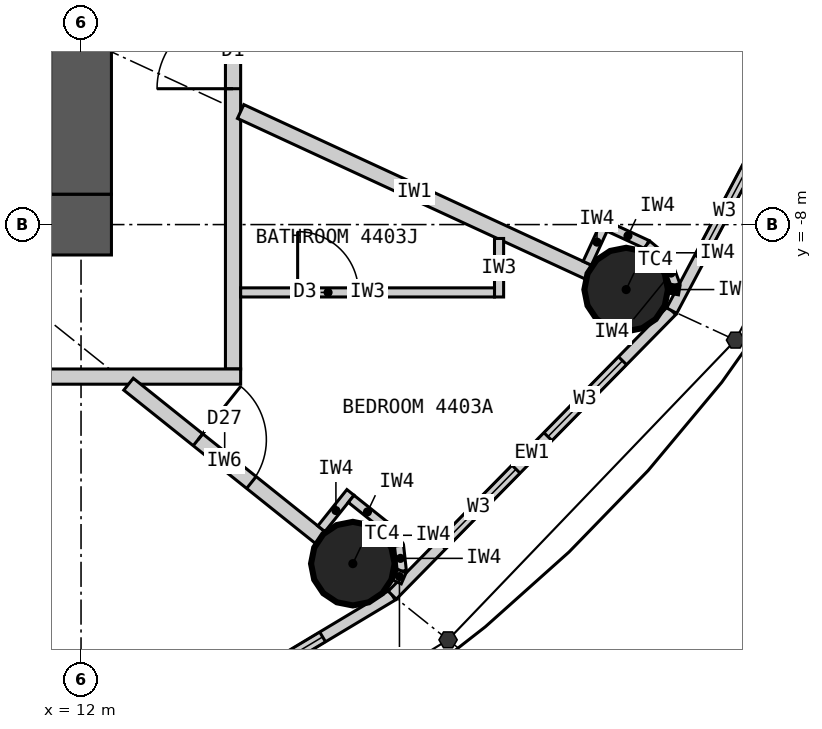
"""IFC4 building model, lengths in metres.
Left out: names, types, materials, properties, quantities, classifications, styles, units other than length and angle.
Written with IfcOpenShell. Run it as: python <this file> out.ifc"""

import sys

from ifc_helpers import new_model, si_unit, direction, frame, frame_2d, origin, origin_2d, place, context, subcontext, project, spatial, rectangle, circle, extrude, element, fill, save


model = new_model("IFC4")
c1 = context("Model", 3, precision=1e-05, world=origin(), true_north=direction((0.0, 1.0)))
c2 = subcontext(c1, "Body", "Model", "MODEL_VIEW")
j1 = project(units=[si_unit("LENGTHUNIT", "METRE"), si_unit("PLANEANGLEUNIT", "RADIAN")], contexts=[c1])
p1 = place(None, origin())
s1 = spatial("IfcSite", under=j1, at=p1, CompositionType="ELEMENT")
p2 = place(p1, origin())
s2 = spatial("IfcBuilding", under=s1, at=p2, CompositionType="ELEMENT")
p3 = place(p2, frame((0.0, 0.0, 166.5)))
s3 = spatial("IfcBuildingStorey", under=s2, at=p3, CompositionType="ELEMENT", Elevation=166.5)
for number, where, z_axis, x_axis in (
    (1, (15.576, -12.461, 0.0), (0.0, 0.0, 1.0), (1.0, 0.0, 0.0)),
    (2, (19.172, -8.855, 0.0), (0.0, 0.0, 1.0), (1.0, 0.0, 0.0)),
):
    element("IfcColumn", number, at=place(p3, frame(where, z_axis=z_axis, x_axis=x_axis)), inside=s3, PredefinedType="COLUMN", context=c2, shape_type="SweptSolid", body=[
        extrude(circle(Radius=0.55, at=origin_2d()), origin(), (0.0, 0.0, 1.0), 3.3),
    ])
p4 = place(p3, frame((12.4, -8.0, 0.0), z_axis=(0.0, 0.0, 1.0), x_axis=(-1.0, 0.0, 0.0)))
e3 = element("IfcWall", 3, at=p4, inside=s3, PredefinedType="SHEAR", context=c2, shape_type="SweptSolid", body=[
    extrude(rectangle(XDim=24.8, YDim=0.8, at=frame_2d((12.4, 0.0))), origin(), (0.0, 0.0, 1.0), 3.3),
])
p5 = place(p4, frame((11.1, 0.0, 0.0)))
e4 = element("IfcOpeningElement", 4, at=p5, cuts=e3, PredefinedType="OPENING", context=c2, shape_type="SweptSolid", body=[
    extrude(rectangle(XDim=1.2, YDim=2.2, at=frame_2d((0.6, 1.1))), frame((0.0, 0.41, 0.0), z_axis=(0.0, -1.0, 0.0), x_axis=(1.0, 0.0, 0.0)), (0.0, 0.0, 1.0), 0.82),
])
p6 = place(p4, frame((18.7, 0.0, 0.0)))
e5 = element("IfcOpeningElement", 5, at=p6, cuts=e3, PredefinedType="OPENING", context=c2, shape_type="SweptSolid", body=[
    extrude(rectangle(XDim=0.9, YDim=2.2, at=frame_2d((0.45, 1.1))), frame((0.0, 0.41, 0.0), z_axis=(0.0, -1.0, 0.0), x_axis=(1.0, 0.0, 0.0)), (0.0, 0.0, 1.0), 0.82),
])
p7 = place(p3, frame((12.0, -7.6, 0.0), z_axis=(0.0, 0.0, 1.0), x_axis=(0.0, 1.0, 0.0)))
e6 = element("IfcWall", 6, at=p7, inside=s3, PredefinedType="SHEAR", context=c2, shape_type="SweptSolid", body=[
    extrude(rectangle(XDim=15.2, YDim=0.8, at=frame_2d((7.6, 0.0))), origin(), (0.0, 0.0, 1.0), 3.3),
])
p8 = place(p7, frame((6.7, 0.0, 0.0)))
e7 = element("IfcOpeningElement", 7, at=p8, cuts=e6, PredefinedType="OPENING", context=c2, shape_type="SweptSolid", body=[
    extrude(rectangle(XDim=1.8, YDim=2.2, at=frame_2d((0.9, 1.1))), frame((0.0, 0.41, 0.0), z_axis=(0.0, -1.0, 0.0), x_axis=(1.0, 0.0, 0.0)), (0.0, 0.0, 1.0), 0.82),
])
p9 = place(p3, frame((11.346, -15.722, 0.0), z_axis=(0.0, 0.0, 1.0), x_axis=(0.857695199231, 0.514158482587, 0.0)))
e8 = element("IfcWall", 8, at=p9, inside=s3, PredefinedType="ELEMENTEDWALL", context=c2, shape_type="SweptSolid", body=[
    extrude(rectangle(XDim=5.536, YDim=0.15, at=frame_2d((2.768, 0.0))), origin(), (0.0, 0.0, 1.0), 3.12),
])
p10 = place(p9, frame((1.068, 0.0, 0.9)))
e9 = element("IfcOpeningElement", 9, at=p10, cuts=e8, PredefinedType="OPENING", context=c2, shape_type="SweptSolid", body=[
    extrude(rectangle(XDim=1.4, YDim=1.9, at=frame_2d((0.7, 0.95))), frame((0.0, 0.085, 0.0), z_axis=(0.0, -1.0, 0.0), x_axis=(1.0, 0.0, 0.0)), (0.0, 0.0, 1.0), 0.17),
])
p11 = place(p9, frame((3.068, 0.0, 0.9)))
e10 = element("IfcOpeningElement", 10, at=p11, cuts=e8, PredefinedType="OPENING", context=c2, shape_type="SweptSolid", body=[
    extrude(rectangle(XDim=1.4, YDim=1.9, at=frame_2d((0.7, 0.95))), frame((0.0, 0.085, 0.0), z_axis=(0.0, -1.0, 0.0), x_axis=(1.0, 0.0, 0.0)), (0.0, 0.0, 1.0), 0.17),
])
p12 = place(p3, frame((16.095, -12.876, 0.0), z_axis=(0.0, 0.0, 1.0), x_axis=(0.700727467776, 0.71342905457, 0.0)))
e11 = element("IfcWall", 11, at=p12, inside=s3, PredefinedType="ELEMENTEDWALL", context=c2, shape_type="SweptSolid", body=[
    extrude(rectangle(XDim=5.247, YDim=0.15, at=frame_2d((2.624, 0.0))), origin(), (0.0, 0.0, 1.0), 3.12),
])
p13 = place(p12, frame((0.924, 0.0, 0.9)))
e12 = element("IfcOpeningElement", 12, at=p13, cuts=e11, PredefinedType="OPENING", context=c2, shape_type="SweptSolid", body=[
    extrude(rectangle(XDim=1.4, YDim=1.9, at=frame_2d((0.7, 0.95))), frame((0.0, 0.085, 0.0), z_axis=(0.0, -1.0, 0.0), x_axis=(1.0, 0.0, 0.0)), (0.0, 0.0, 1.0), 0.17),
])
p14 = place(p12, frame((2.924, 0.0, 0.9)))
e13 = element("IfcOpeningElement", 13, at=p14, cuts=e11, PredefinedType="OPENING", context=c2, shape_type="SweptSolid", body=[
    extrude(rectangle(XDim=1.4, YDim=1.9, at=frame_2d((0.7, 0.95))), frame((0.0, 0.085, 0.0), z_axis=(0.0, -1.0, 0.0), x_axis=(1.0, 0.0, 0.0)), (0.0, 0.0, 1.0), 0.17),
])
p15 = place(p3, frame((19.772, -9.132, 0.0), z_axis=(0.0, 0.0, 1.0), x_axis=(0.468428906714, 0.883501193748, 0.0)))
e14 = element("IfcWall", 14, at=p15, inside=s3, PredefinedType="ELEMENTEDWALL", context=c2, shape_type="SweptSolid", body=[
    extrude(rectangle(XDim=4.974, YDim=0.15, at=frame_2d((2.487, 0.0))), origin(), (0.0, 0.0, 1.0), 3.12),
])
p16 = place(p15, frame((0.787, 0.0, 0.9)))
e15 = element("IfcOpeningElement", 15, at=p16, cuts=e14, PredefinedType="OPENING", context=c2, shape_type="SweptSolid", body=[
    extrude(rectangle(XDim=1.4, YDim=1.9, at=frame_2d((0.7, 0.95))), frame((0.0, 0.085, 0.0), z_axis=(0.0, -1.0, 0.0), x_axis=(1.0, 0.0, 0.0)), (0.0, 0.0, 1.0), 0.17),
])
p17 = place(p15, frame((2.787, 0.0, 0.9)))
e16 = element("IfcOpeningElement", 16, at=p17, cuts=e14, PredefinedType="OPENING", context=c2, shape_type="SweptSolid", body=[
    extrude(rectangle(XDim=1.4, YDim=1.9, at=frame_2d((0.7, 0.95))), frame((0.0, 0.085, 0.0), z_axis=(0.0, -1.0, 0.0), x_axis=(1.0, 0.0, 0.0)), (0.0, 0.0, 1.0), 0.17),
])
p18 = place(p3, frame((14.0, -9.9, 0.0), z_axis=(0.0, 0.0, 1.0), x_axis=(0.0, 1.0, 0.0)))
e17 = element("IfcWall", 17, at=p18, inside=s3, PredefinedType="PARTITIONING", context=c2, shape_type="SweptSolid", body=[
    extrude(rectangle(XDim=19.8, YDim=0.2, at=frame_2d((9.9, 0.0))), origin(), (0.0, 0.0, 1.0), 3.12),
])
p19 = place(p18, frame((3.688, 0.0, 0.0)))
e18 = element("IfcOpeningElement", 18, at=p19, cuts=e17, PredefinedType="OPENING", context=c2, shape_type="SweptSolid", body=[
    extrude(rectangle(XDim=1.0, YDim=2.2, at=frame_2d((0.5, 1.1))), frame((0.0, 0.11, 0.0), z_axis=(0.0, -1.0, 0.0), x_axis=(1.0, 0.0, 0.0)), (0.0, 0.0, 1.0), 0.22),
])
p20 = place(p18, frame((9.979, 0.0, 0.0)))
e19 = element("IfcOpeningElement", 19, at=p20, cuts=e17, PredefinedType="OPENING", context=c2, shape_type="SweptSolid", body=[
    extrude(rectangle(XDim=1.0, YDim=2.2, at=frame_2d((0.5, 1.1))), frame((0.0, 0.11, 0.0), z_axis=(0.0, -1.0, 0.0), x_axis=(1.0, 0.0, 0.0)), (0.0, 0.0, 1.0), 0.22),
])
p21 = place(p18, frame((17.122, 0.0, 0.0)))
e20 = element("IfcOpeningElement", 20, at=p21, cuts=e17, PredefinedType="OPENING", context=c2, shape_type="SweptSolid", body=[
    extrude(rectangle(XDim=1.0, YDim=2.2, at=frame_2d((0.5, 1.1))), frame((0.0, 0.11, 0.0), z_axis=(0.0, -1.0, 0.0), x_axis=(1.0, 0.0, 0.0)), (0.0, 0.0, 1.0), 0.22),
])
p22 = place(p3, frame((14.1, -10.0, 0.0), z_axis=(0.0, 0.0, 1.0), x_axis=(-1.0, 0.0, 0.0)))
e21 = element("IfcWall", 21, at=p22, inside=s3, PredefinedType="PARTITIONING", context=c2, shape_type="SweptSolid", body=[
    extrude(rectangle(XDim=28.2, YDim=0.2, at=frame_2d((14.1, 0.0))), origin(), (0.0, 0.0, 1.0), 3.12),
])
p23 = place(p22, frame((23.165, 0.0, 0.0)))
e22 = element("IfcOpeningElement", 22, at=p23, cuts=e21, PredefinedType="OPENING", context=c2, shape_type="SweptSolid", body=[
    extrude(rectangle(XDim=1.0, YDim=2.2, at=frame_2d((0.5, 1.1))), frame((0.0, 0.11, 0.0), z_axis=(0.0, -1.0, 0.0), x_axis=(1.0, 0.0, 0.0)), (0.0, 0.0, 1.0), 0.22),
])
p24 = place(p22, frame((13.923, 0.0, 0.0)))
e23 = element("IfcOpeningElement", 23, at=p24, cuts=e21, PredefinedType="OPENING", context=c2, shape_type="SweptSolid", body=[
    extrude(rectangle(XDim=1.0, YDim=2.2, at=frame_2d((0.5, 1.1))), frame((0.0, 0.11, 0.0), z_axis=(0.0, -1.0, 0.0), x_axis=(1.0, 0.0, 0.0)), (0.0, 0.0, 1.0), 0.22),
])
p25 = place(p22, frame((7.957, 0.0, 0.0)))
e24 = element("IfcOpeningElement", 24, at=p25, cuts=e21, PredefinedType="OPENING", context=c2, shape_type="SweptSolid", body=[
    extrude(rectangle(XDim=1.0, YDim=2.2, at=frame_2d((0.5, 1.1))), frame((0.0, 0.11, 0.0), z_axis=(0.0, -1.0, 0.0), x_axis=(1.0, 0.0, 0.0)), (0.0, 0.0, 1.0), 0.22),
])
p26 = place(p3, frame((12.625, -10.1, 0.0), z_axis=(0.0, 0.0, 1.0), x_axis=(0.780876185034, -0.624685827954, 0.0)))
e25 = element("IfcWall", 25, at=p26, inside=s3, PredefinedType="PARTITIONING", context=c2, shape_type="SweptSolid", body=[
    extrude(rectangle(XDim=3.229, YDim=0.2, at=frame_2d((1.615, 0.0))), origin(), (0.0, 0.0, 1.0), 2.42),
])
p27 = place(p26, frame((1.17, 0.0, 0.0)))
e26 = element("IfcOpeningElement", 26, at=p27, cuts=e25, PredefinedType="OPENING", context=c2, shape_type="SweptSolid", body=[
    extrude(rectangle(XDim=0.9, YDim=2.1, at=frame_2d((0.45, 1.05))), frame((0.0, 0.11, 0.0), z_axis=(0.0, -1.0, 0.0), x_axis=(1.0, 0.0, 0.0)), (0.0, 0.0, 1.0), 0.22),
])
p28 = place(p3, frame((14.1, -6.512, 0.0), z_axis=(0.0, 0.0, 1.0), x_axis=(0.907823150669, -0.419353224751, 0.0)))
e27 = element("IfcWall", 27, at=p28, inside=s3, PredefinedType="PARTITIONING", context=c2, shape_type="SweptSolid", body=[
    extrude(rectangle(XDim=5.037, YDim=0.2, at=frame_2d((2.519, 0.0))), origin(), (0.0, 0.0, 1.0), 2.32),
])
p29 = place(p3, frame((17.5, -8.183, 0.0), z_axis=(0.0, 0.0, 1.0), x_axis=(0.0, -1.0, 0.0)))
e28 = element("IfcWall", 28, at=p29, inside=s3, PredefinedType="PARTITIONING", context=c2, shape_type="SweptSolid", body=[
    extrude(rectangle(XDim=0.77, YDim=0.12, at=frame_2d((0.385, 0.0))), origin(), (0.0, 0.0, 1.0), 3.12),
])
p30 = place(p3, frame((14.1, -8.893, 0.0), z_axis=(0.0, 0.0, 1.0), x_axis=(1.0, 0.0, 0.0)))
e29 = element("IfcWall", 29, at=p30, inside=s3, PredefinedType="PARTITIONING", context=c2, shape_type="SweptSolid", body=[
    extrude(rectangle(XDim=3.34, YDim=0.12, at=frame_2d((1.67, 0.0))), origin(), (0.0, 0.0, 1.0), 3.12),
])
p31 = place(p30, frame((0.75, 0.0, 0.0)))
e30 = element("IfcOpeningElement", 30, at=p31, cuts=e29, PredefinedType="OPENING", context=c2, shape_type="SweptSolid", body=[
    extrude(rectangle(XDim=0.8, YDim=2.1, at=frame_2d((0.4, 1.05))), frame((0.0, 0.07, 0.0), z_axis=(0.0, -1.0, 0.0), x_axis=(1.0, 0.0, 0.0)), (0.0, 0.0, 1.0), 0.14),
])
p32 = place(p3, frame((15.162, -12.002, 0.0), z_axis=(0.0, 0.0, 1.0), x_axis=(0.624597762427, 0.780946627607, 0.0)))
e31 = element("IfcWall", 31, at=p32, inside=s3, PredefinedType="PARTITIONING", context=c2, shape_type="SweptSolid", body=[
    extrude(rectangle(XDim=0.612, YDim=0.12, at=frame_2d((0.306, 0.0))), origin(), (0.0, 0.0, 1.0), 3.12),
])
p33 = place(p3, frame((15.554, -11.608, 0.0), z_axis=(0.0, 0.0, 1.0), x_axis=(0.780695577787, -0.624911525597, 0.0)))
e32 = element("IfcWall", 32, at=p33, inside=s3, PredefinedType="PARTITIONING", context=c2, shape_type="SweptSolid", body=[
    extrude(rectangle(XDim=0.55, YDim=0.12, at=frame_2d((0.275, 0.0))), origin(), (0.0, 0.0, 1.0), 3.12),
])
p34 = place(p3, frame((15.984, -11.952, 0.0), z_axis=(0.0, 0.0, 1.0), x_axis=(0.592335221171, -0.805691619517, 0.0)))
e33 = element("IfcWall", 33, at=p34, inside=s3, PredefinedType="PARTITIONING", context=c2, shape_type="SweptSolid", body=[
    extrude(rectangle(XDim=0.338, YDim=0.12, at=frame_2d((0.169, 0.0))), origin(), (0.0, 0.0, 1.0), 3.12),
])
p35 = place(p3, frame((16.184, -12.224, 0.0), z_axis=(0.0, 0.0, 1.0), x_axis=(0.110669692975, -0.993857242795, 0.0)))
e34 = element("IfcWall", 34, at=p35, inside=s3, PredefinedType="PARTITIONING", context=c2, shape_type="SweptSolid", body=[
    extrude(rectangle(XDim=0.337, YDim=0.12, at=frame_2d((0.169, 0.0))), origin(), (0.0, 0.0, 1.0), 3.12),
])
p36 = place(p3, frame((16.221, -12.559, 0.0), z_axis=(0.0, 0.0, 1.0), x_axis=(-0.401064416249, -0.916049853457, 0.0)))
e35 = element("IfcWall", 35, at=p36, inside=s3, PredefinedType="PARTITIONING", context=c2, shape_type="SweptSolid", body=[
    extrude(rectangle(XDim=0.156, YDim=0.12, at=frame_2d((0.078, 0.0))), origin(), (0.0, 0.0, 1.0), 3.12),
])
p37 = place(p3, frame((18.66, -8.509, 0.0), z_axis=(0.0, 0.0, 1.0), x_axis=(0.419083463716, 0.907947713494, 0.0)))
e36 = element("IfcWall", 36, at=p37, inside=s3, PredefinedType="PARTITIONING", context=c2, shape_type="SweptSolid", body=[
    extrude(rectangle(XDim=0.612, YDim=0.12, at=frame_2d((0.306, 0.0))), origin(), (0.0, 0.0, 1.0), 3.12),
])
p38 = place(p3, frame((18.946, -8.032, 0.0), z_axis=(0.0, 0.0, 1.0), x_axis=(0.907842467956, -0.419311403822, 0.0)))
e37 = element("IfcWall", 37, at=p38, inside=s3, PredefinedType="PARTITIONING", context=c2, shape_type="SweptSolid", body=[
    extrude(rectangle(XDim=0.55, YDim=0.12, at=frame_2d((0.275, 0.0))), origin(), (0.0, 0.0, 1.0), 3.12),
])
p39 = place(p3, frame((19.446, -8.263, 0.0), z_axis=(0.0, 0.0, 1.0), x_axis=(0.768221279597, -0.640184399664, 0.0)))
e38 = element("IfcWall", 38, at=p39, inside=s3, PredefinedType="PARTITIONING", context=c2, shape_type="SweptSolid", body=[
    extrude(rectangle(XDim=0.337, YDim=0.12, at=frame_2d((0.169, 0.0))), origin(), (0.0, 0.0, 1.0), 3.12),
])
p40 = place(p3, frame((19.705, -8.479, 0.0), z_axis=(0.0, 0.0, 1.0), x_axis=(0.345571344575, -0.938392479621, 0.0)))
e39 = element("IfcWall", 39, at=p40, inside=s3, PredefinedType="PARTITIONING", context=c2, shape_type="SweptSolid", body=[
    extrude(rectangle(XDim=0.338, YDim=0.12, at=frame_2d((0.169, 0.0))), origin(), (0.0, 0.0, 1.0), 3.12),
])
p41 = place(p3, frame((19.822, -8.796, 0.0), z_axis=(0.0, 0.0, 1.0), x_axis=(-0.169701508781, -0.985495508827, 0.0)))
e40 = element("IfcWall", 40, at=p41, inside=s3, PredefinedType="PARTITIONING", context=c2, shape_type="SweptSolid", body=[
    extrude(rectangle(XDim=0.119, YDim=0.12, at=frame_2d((0.06, 0.0))), origin(), (0.0, 0.0, 1.0), 3.12),
])
p42 = place(p11, origin())
e41 = element("IfcWindow", 41, at=p42, inside=s3, PartitioningType="SINGLE_PANEL", PredefinedType="WINDOW", context=c2, shape_type="SweptSolid", body=[
    extrude(rectangle(XDim=1.4, YDim=1.9, at=frame_2d((0.7, 0.95))), frame((0.0, 0.03, 0.0), z_axis=(0.0, -1.0, 0.0), x_axis=(1.0, 0.0, 0.0)), (0.0, 0.0, 1.0), 0.06),
])
fill(e10, e41)
p43 = place(p13, origin())
e42 = element("IfcWindow", 42, at=p43, inside=s3, PartitioningType="SINGLE_PANEL", PredefinedType="WINDOW", context=c2, shape_type="SweptSolid", body=[
    extrude(rectangle(XDim=1.4, YDim=1.9, at=frame_2d((0.7, 0.95))), frame((0.0, 0.03, 0.0), z_axis=(0.0, -1.0, 0.0), x_axis=(1.0, 0.0, 0.0)), (0.0, 0.0, 1.0), 0.06),
])
fill(e12, e42)
p44 = place(p14, origin())
e43 = element("IfcWindow", 43, at=p44, inside=s3, PartitioningType="SINGLE_PANEL", PredefinedType="WINDOW", context=c2, shape_type="SweptSolid", body=[
    extrude(rectangle(XDim=1.4, YDim=1.9, at=frame_2d((0.7, 0.95))), frame((0.0, 0.03, 0.0), z_axis=(0.0, -1.0, 0.0), x_axis=(1.0, 0.0, 0.0)), (0.0, 0.0, 1.0), 0.06),
])
fill(e13, e43)
p45 = place(p16, origin())
e44 = element("IfcWindow", 44, at=p45, inside=s3, PartitioningType="SINGLE_PANEL", PredefinedType="WINDOW", context=c2, shape_type="SweptSolid", body=[
    extrude(rectangle(XDim=1.4, YDim=1.9, at=frame_2d((0.7, 0.95))), frame((0.0, 0.03, 0.0), z_axis=(0.0, -1.0, 0.0), x_axis=(1.0, 0.0, 0.0)), (0.0, 0.0, 1.0), 0.06),
])
fill(e15, e44)
p46 = place(p31, origin())
e45 = element("IfcDoor", 45, at=p46, inside=s3, OperationType="SINGLE_SWING_LEFT", PredefinedType="DOOR", context=c2, shape_type="SweptSolid", body=[
    extrude(rectangle(XDim=0.8, YDim=2.1, at=frame_2d((0.4, 1.05))), frame((0.0, 0.025, 0.0), z_axis=(0.0, -1.0, 0.0), x_axis=(1.0, 0.0, 0.0)), (0.0, 0.0, 1.0), 0.05),
])
fill(e30, e45)
p47 = place(p27, origin())
e46 = element("IfcDoor", 46, at=p47, inside=s3, OperationType="SINGLE_SWING_LEFT", PredefinedType="DOOR", context=c2, shape_type="SweptSolid", body=[
    extrude(rectangle(XDim=0.9, YDim=2.1, at=frame_2d((0.45, 1.05))), frame((0.0, 0.025, 0.0), z_axis=(0.0, -1.0, 0.0), x_axis=(1.0, 0.0, 0.0)), (0.0, 0.0, 1.0), 0.05),
])
fill(e26, e46)
p48 = place(p19, origin())
e47 = element("IfcDoor", 47, at=p48, inside=s3, OperationType="SINGLE_SWING_LEFT", PredefinedType="DOOR", context=c2, shape_type="SweptSolid", body=[
    extrude(rectangle(XDim=1.0, YDim=2.2, at=frame_2d((0.5, 1.1))), frame((0.0, 0.025, 0.0), z_axis=(0.0, -1.0, 0.0), x_axis=(1.0, 0.0, 0.0)), (0.0, 0.0, 1.0), 0.05),
])
fill(e18, e47)
save(model, sys.argv[1])
